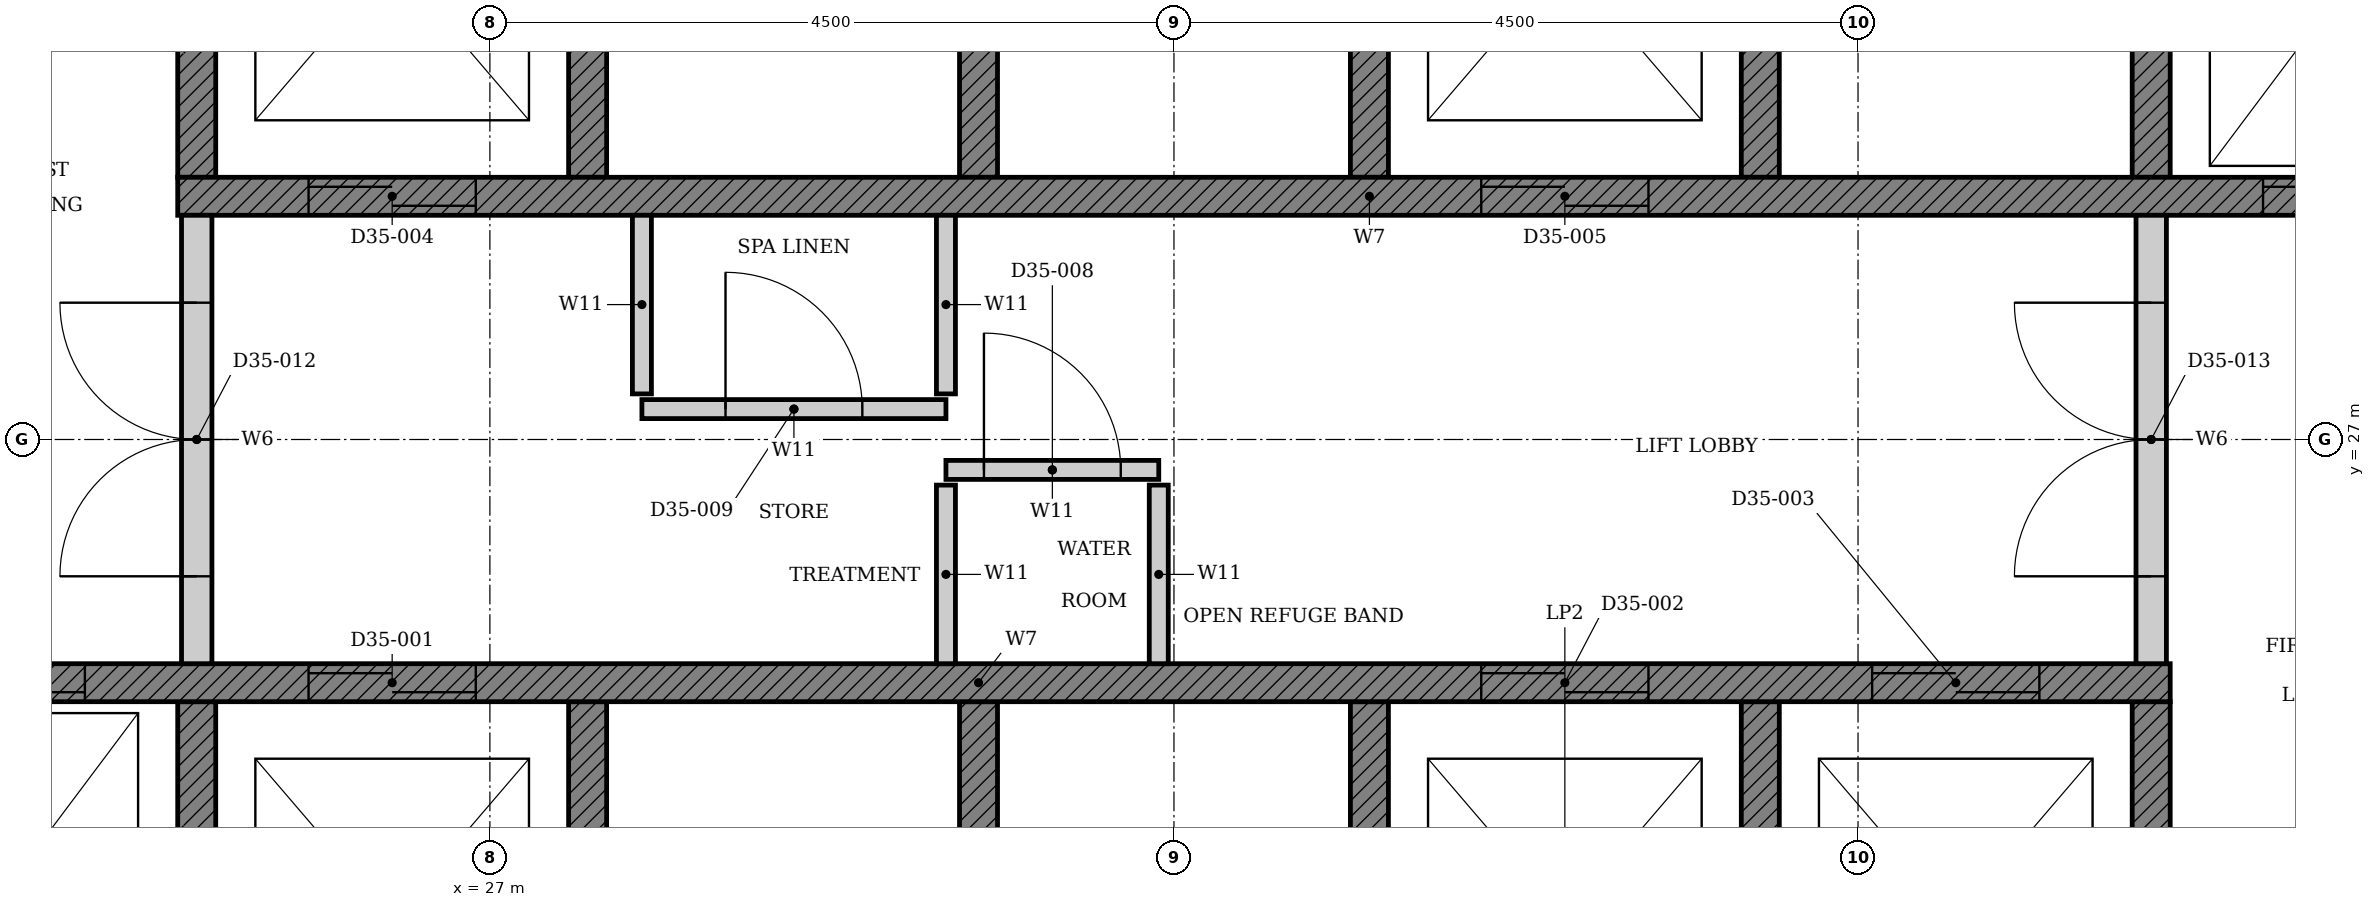
"""IFC4 building model, lengths in metres.
Left out: names, types, materials, properties, quantities, classifications, styles, units other than length and angle.
Written with IfcOpenShell. Run it as: python <this file> out.ifc"""

import sys

from ifc_helpers import new_model, si_unit, direction, frame, frame_2d, origin, place, context, subcontext, project, spatial, polyline, rectangle, outline, extrude, element, fill, save


model = new_model("IFC4")
c1 = context("Model", 3, precision=1e-05, world=origin(), true_north=direction((0.0, 1.0)))
c2 = subcontext(c1, "Body", "Model", "MODEL_VIEW")
j1 = project(units=[si_unit("LENGTHUNIT", "METRE"), si_unit("PLANEANGLEUNIT", "RADIAN")], contexts=[c1])
p1 = place(None, origin())
s1 = spatial("IfcSite", under=j1, at=p1, CompositionType="ELEMENT")
p2 = place(p1, origin())
s2 = spatial("IfcBuilding", under=s1, at=p2, CompositionType="ELEMENT")
p3 = place(p2, frame((0.0, 0.0, 140.4)))
s3 = spatial("IfcBuildingStorey", under=s2, at=p3, CompositionType="ELEMENT", Elevation=140.4)
p4 = place(p3, origin())
e1 = element("IfcWall", 1, at=p4, inside=s3, PredefinedType="SHEAR", context=c2, shape_type="SweptSolid", body=[
    extrude(outline(polyline([(22.375, 22.35), (38.053, 22.35), (38.053, 25.275), (37.803, 25.275), (37.803, 22.65), (35.482, 22.65), (35.482, 25.275), (35.232, 25.275), (35.232, 22.65), (32.911, 22.65), (32.911, 25.275), (32.661, 25.275), (32.661, 22.65), (30.339, 22.65), (30.339, 25.275), (30.089, 25.275), (30.089, 22.65), (27.768, 22.65), (27.768, 25.275), (27.518, 25.275), (27.518, 22.65), (25.197, 22.65), (25.197, 25.275), (24.947, 25.275), (24.947, 22.65), (22.625, 22.65), (22.625, 25.275), (22.375, 25.275), (22.375, 22.35)])), origin(), (0.0, 0.0, 1.0), 4.45),
])
p5 = place(p3, origin())
e2 = element("IfcWall", 2, at=p5, inside=s3, PredefinedType="SHEAR", context=c2, shape_type="SweptSolid", body=[
    extrude(outline(polyline([(24.947, 28.725), (25.197, 28.725), (25.197, 31.35), (27.518, 31.35), (27.518, 28.725), (27.768, 28.725), (27.768, 31.35), (30.089, 31.35), (30.089, 28.725), (30.339, 28.725), (30.339, 31.35), (32.661, 31.35), (32.661, 28.725), (32.911, 28.725), (32.911, 31.35), (35.232, 31.35), (35.232, 28.725), (35.482, 28.725), (35.482, 31.35), (37.803, 31.35), (37.803, 28.725), (38.053, 28.725), (38.053, 31.35), (40.375, 31.35), (40.375, 28.725), (40.625, 28.725), (40.625, 31.65), (24.947, 31.65), (24.947, 28.725)])), origin(), (0.0, 0.0, 1.0), 4.45),
])
p6 = place(p3, frame((22.375, 25.4, 0.0), z_axis=(0.0, 0.0, 1.0), x_axis=(1.0, 0.0, 0.0)))
e3 = element("IfcWall", 3, at=p6, inside=s3, PredefinedType="SHEAR", context=c2, shape_type="SweptSolid", body=[
    extrude(rectangle(XDim=15.678, YDim=0.25, at=frame_2d((7.839, 0.0))), origin(), (0.0, 0.0, 1.0), 4.45),
])
p7 = place(p6, frame((3.432, 0.0, 0.0)))
e4 = element("IfcOpeningElement", 4, at=p7, cuts=e3, PredefinedType="OPENING", context=c2, shape_type="SweptSolid", body=[
    extrude(rectangle(XDim=1.1, YDim=2.1, at=frame_2d((0.55, 1.05))), frame((0.0, 0.135, 0.0), z_axis=(0.0, -1.0, 0.0), x_axis=(1.0, 0.0, 0.0)), (0.0, 0.0, 1.0), 0.27),
])
p8 = place(p6, frame((11.146, 0.0, 0.0)))
e5 = element("IfcOpeningElement", 5, at=p8, cuts=e3, PredefinedType="OPENING", context=c2, shape_type="SweptSolid", body=[
    extrude(rectangle(XDim=1.1, YDim=2.1, at=frame_2d((0.55, 1.05))), frame((0.0, 0.135, 0.0), z_axis=(0.0, -1.0, 0.0), x_axis=(1.0, 0.0, 0.0)), (0.0, 0.0, 1.0), 0.27),
])
p9 = place(p6, frame((13.718, 0.0, 0.0)))
e6 = element("IfcOpeningElement", 6, at=p9, cuts=e3, PredefinedType="OPENING", context=c2, shape_type="SweptSolid", body=[
    extrude(rectangle(XDim=1.1, YDim=2.1, at=frame_2d((0.55, 1.05))), frame((0.0, 0.135, 0.0), z_axis=(0.0, -1.0, 0.0), x_axis=(1.0, 0.0, 0.0)), (0.0, 0.0, 1.0), 0.27),
])
p10 = place(p6, frame((0.861, 0.0, 0.0)))
e7 = element("IfcOpeningElement", 7, at=p10, cuts=e3, PredefinedType="OPENING", context=c2, shape_type="SweptSolid", body=[
    extrude(rectangle(XDim=1.1, YDim=2.1, at=frame_2d((0.55, 1.05))), frame((0.0, 0.135, 0.0), z_axis=(0.0, -1.0, 0.0), x_axis=(1.0, 0.0, 0.0)), (0.0, 0.0, 1.0), 0.27),
])
p11 = place(p3, frame((24.947, 28.6, 0.0), z_axis=(0.0, 0.0, 1.0), x_axis=(1.0, 0.0, 0.0)))
e8 = element("IfcWall", 8, at=p11, inside=s3, PredefinedType="SHEAR", context=c2, shape_type="SweptSolid", body=[
    extrude(rectangle(XDim=15.678, YDim=0.25, at=frame_2d((7.839, 0.0))), origin(), (0.0, 0.0, 1.0), 4.45),
])
p12 = place(p11, frame((0.861, 0.0, 0.0)))
e9 = element("IfcOpeningElement", 9, at=p12, cuts=e8, PredefinedType="OPENING", context=c2, shape_type="SweptSolid", body=[
    extrude(rectangle(XDim=1.1, YDim=2.1, at=frame_2d((0.55, 1.05))), frame((0.0, 0.135, 0.0), z_axis=(0.0, -1.0, 0.0), x_axis=(1.0, 0.0, 0.0)), (0.0, 0.0, 1.0), 0.27),
])
p13 = place(p11, frame((8.575, 0.0, 0.0)))
e10 = element("IfcOpeningElement", 10, at=p13, cuts=e8, PredefinedType="OPENING", context=c2, shape_type="SweptSolid", body=[
    extrude(rectangle(XDim=1.1, YDim=2.1, at=frame_2d((0.55, 1.05))), frame((0.0, 0.135, 0.0), z_axis=(0.0, -1.0, 0.0), x_axis=(1.0, 0.0, 0.0)), (0.0, 0.0, 1.0), 0.27),
])
p14 = place(p11, frame((13.718, 0.0, 0.0)))
e11 = element("IfcOpeningElement", 11, at=p14, cuts=e8, PredefinedType="OPENING", context=c2, shape_type="SweptSolid", body=[
    extrude(rectangle(XDim=1.1, YDim=2.1, at=frame_2d((0.55, 1.05))), frame((0.0, 0.135, 0.0), z_axis=(0.0, -1.0, 0.0), x_axis=(1.0, 0.0, 0.0)), (0.0, 0.0, 1.0), 0.27),
])
p15 = place(p3, frame((30.0, 26.8, 0.0), z_axis=(0.0, 0.0, 1.0), x_axis=(1.0, 0.0, 0.0)))
e12 = element("IfcWall", 12, at=p15, inside=s3, PredefinedType="PARTITIONING", context=c2, shape_type="SweptSolid", body=[
    extrude(rectangle(XDim=1.4, YDim=0.125, at=frame_2d((0.7, 0.0))), origin(), (0.0, 0.0, 1.0), 4.45),
])
p16 = place(p15, frame((0.25, 0.0, 0.0)))
e13 = element("IfcOpeningElement", 13, at=p16, cuts=e12, PredefinedType="OPENING", context=c2, shape_type="SweptSolid", body=[
    extrude(rectangle(XDim=0.9, YDim=2.1, at=frame_2d((0.45, 1.05))), frame((0.0, 0.073, 0.0), z_axis=(0.0, -1.0, 0.0), x_axis=(1.0, 0.0, 0.0)), (0.0, 0.0, 1.0), 0.145),
])
for number, where, z_axis, x_axis in (
    (14, (30.0, 25.525, 0.0), (0.0, 0.0, 1.0), (0.0, 1.0, 0.0)),
    (15, (31.4, 25.525, 0.0), (0.0, 0.0, 1.0), (0.0, 1.0, 0.0)),
):
    element("IfcWall", number, at=place(p3, frame(where, z_axis=z_axis, x_axis=x_axis)), inside=s3, PredefinedType="PARTITIONING", context=c2, shape_type="SweptSolid", body=[
        extrude(rectangle(XDim=1.175, YDim=0.125, at=frame_2d((0.587, 0.0))), origin(), (0.0, 0.0, 1.0), 4.45),
    ])
p17 = place(p3, frame((28.0, 27.2, 0.0), z_axis=(0.0, 0.0, 1.0), x_axis=(1.0, 0.0, 0.0)))
e16 = element("IfcWall", 16, at=p17, inside=s3, PredefinedType="PARTITIONING", context=c2, shape_type="SweptSolid", body=[
    extrude(rectangle(XDim=2.0, YDim=0.125, at=frame_2d((1.0, 0.0))), origin(), (0.0, 0.0, 1.0), 4.45),
])
p18 = place(p17, frame((0.55, 0.0, 0.0)))
e17 = element("IfcOpeningElement", 17, at=p18, cuts=e16, PredefinedType="OPENING", context=c2, shape_type="SweptSolid", body=[
    extrude(rectangle(XDim=0.9, YDim=2.1, at=frame_2d((0.45, 1.05))), frame((0.0, 0.073, 0.0), z_axis=(0.0, -1.0, 0.0), x_axis=(1.0, 0.0, 0.0)), (0.0, 0.0, 1.0), 0.145),
])
for number, where, z_axis, x_axis in (
    (18, (28.0, 28.475, 0.0), (0.0, 0.0, 1.0), (0.0, -1.0, 0.0)),
    (19, (30.0, 28.475, 0.0), (0.0, 0.0, 1.0), (0.0, -1.0, 0.0)),
):
    element("IfcWall", number, at=place(p3, frame(where, z_axis=z_axis, x_axis=x_axis)), inside=s3, PredefinedType="PARTITIONING", context=c2, shape_type="SweptSolid", body=[
        extrude(rectangle(XDim=1.175, YDim=0.125, at=frame_2d((0.587, 0.0))), origin(), (0.0, 0.0, 1.0), 4.45),
    ])
p19 = place(p3, frame((25.072, 25.525, 0.0), z_axis=(0.0, 0.0, 1.0), x_axis=(0.0, 1.0, 0.0)))
e20 = element("IfcWall", 20, at=p19, inside=s3, PredefinedType="PARTITIONING", context=c2, shape_type="SweptSolid", body=[
    extrude(rectangle(XDim=2.95, YDim=0.2, at=frame_2d((1.475, 0.0))), origin(), (0.0, 0.0, 1.0), 4.45),
])
p20 = place(p19, frame((0.575, 0.0, 0.0)))
e21 = element("IfcOpeningElement", 21, at=p20, cuts=e20, PredefinedType="OPENING", context=c2, shape_type="SweptSolid", body=[
    extrude(rectangle(XDim=1.8, YDim=2.1, at=frame_2d((0.9, 1.05))), frame((0.0, 0.11, 0.0), z_axis=(0.0, -1.0, 0.0), x_axis=(1.0, 0.0, 0.0)), (0.0, 0.0, 1.0), 0.22),
])
p21 = place(p3, frame((37.928, 25.525, 0.0), z_axis=(0.0, 0.0, 1.0), x_axis=(0.0, 1.0, 0.0)))
e22 = element("IfcWall", 22, at=p21, inside=s3, PredefinedType="PARTITIONING", context=c2, shape_type="SweptSolid", body=[
    extrude(rectangle(XDim=2.95, YDim=0.2, at=frame_2d((1.475, 0.0))), origin(), (0.0, 0.0, 1.0), 4.45),
])
p22 = place(p21, frame((0.575, 0.0, 0.0)))
e23 = element("IfcOpeningElement", 23, at=p22, cuts=e22, PredefinedType="OPENING", context=c2, shape_type="SweptSolid", body=[
    extrude(rectangle(XDim=1.8, YDim=2.1, at=frame_2d((0.9, 1.05))), frame((0.0, 0.11, 0.0), z_axis=(0.0, -1.0, 0.0), x_axis=(1.0, 0.0, 0.0)), (0.0, 0.0, 1.0), 0.22),
])
p23 = place(p7, origin())
e24 = element("IfcDoor", 24, at=p23, inside=s3, OperationType="DOUBLE_DOOR_SLIDING", PredefinedType="DOOR", context=c2, shape_type="SweptSolid", body=[
    extrude(rectangle(XDim=1.1, YDim=2.1, at=frame_2d((0.55, 1.05))), frame((0.0, 0.025, 0.0), z_axis=(0.0, -1.0, 0.0), x_axis=(1.0, 0.0, 0.0)), (0.0, 0.0, 1.0), 0.05),
])
fill(e4, e24)
p24 = place(p8, origin())
e25 = element("IfcDoor", 25, at=p24, inside=s3, OperationType="DOUBLE_DOOR_SLIDING", PredefinedType="DOOR", context=c2, shape_type="SweptSolid", body=[
    extrude(rectangle(XDim=1.1, YDim=2.1, at=frame_2d((0.55, 1.05))), frame((0.0, 0.025, 0.0), z_axis=(0.0, -1.0, 0.0), x_axis=(1.0, 0.0, 0.0)), (0.0, 0.0, 1.0), 0.05),
])
fill(e5, e25)
p25 = place(p9, origin())
e26 = element("IfcDoor", 26, at=p25, inside=s3, OperationType="DOUBLE_DOOR_SLIDING", PredefinedType="DOOR", context=c2, shape_type="SweptSolid", body=[
    extrude(rectangle(XDim=1.1, YDim=2.1, at=frame_2d((0.55, 1.05))), frame((0.0, 0.025, 0.0), z_axis=(0.0, -1.0, 0.0), x_axis=(1.0, 0.0, 0.0)), (0.0, 0.0, 1.0), 0.05),
])
fill(e6, e26)
p26 = place(p12, origin())
e27 = element("IfcDoor", 27, at=p26, inside=s3, OperationType="DOUBLE_DOOR_SLIDING", PredefinedType="DOOR", context=c2, shape_type="SweptSolid", body=[
    extrude(rectangle(XDim=1.1, YDim=2.1, at=frame_2d((0.55, 1.05))), frame((0.0, 0.025, 0.0), z_axis=(0.0, -1.0, 0.0), x_axis=(1.0, 0.0, 0.0)), (0.0, 0.0, 1.0), 0.05),
])
fill(e9, e27)
p27 = place(p13, origin())
e28 = element("IfcDoor", 28, at=p27, inside=s3, OperationType="DOUBLE_DOOR_SLIDING", PredefinedType="DOOR", context=c2, shape_type="SweptSolid", body=[
    extrude(rectangle(XDim=1.1, YDim=2.1, at=frame_2d((0.55, 1.05))), frame((0.0, 0.025, 0.0), z_axis=(0.0, -1.0, 0.0), x_axis=(1.0, 0.0, 0.0)), (0.0, 0.0, 1.0), 0.05),
])
fill(e10, e28)
p28 = place(p10, origin())
e29 = element("IfcDoor", 29, at=p28, inside=s3, OperationType="DOUBLE_DOOR_SLIDING", PredefinedType="DOOR", context=c2, shape_type="SweptSolid", body=[
    extrude(rectangle(XDim=1.1, YDim=2.1, at=frame_2d((0.55, 1.05))), frame((0.0, 0.025, 0.0), z_axis=(0.0, -1.0, 0.0), x_axis=(1.0, 0.0, 0.0)), (0.0, 0.0, 1.0), 0.05),
])
fill(e7, e29)
p29 = place(p14, origin())
e30 = element("IfcDoor", 30, at=p29, inside=s3, OperationType="DOUBLE_DOOR_SLIDING", PredefinedType="DOOR", context=c2, shape_type="SweptSolid", body=[
    extrude(rectangle(XDim=1.1, YDim=2.1, at=frame_2d((0.55, 1.05))), frame((0.0, 0.025, 0.0), z_axis=(0.0, -1.0, 0.0), x_axis=(1.0, 0.0, 0.0)), (0.0, 0.0, 1.0), 0.05),
])
fill(e11, e30)
p30 = place(p16, origin())
e31 = element("IfcDoor", 31, at=p30, inside=s3, OperationType="SINGLE_SWING_LEFT", PredefinedType="DOOR", context=c2, shape_type="SweptSolid", body=[
    extrude(rectangle(XDim=0.9, YDim=2.1, at=frame_2d((0.45, 1.05))), frame((0.0, 0.025, 0.0), z_axis=(0.0, -1.0, 0.0), x_axis=(1.0, 0.0, 0.0)), (0.0, 0.0, 1.0), 0.05),
])
fill(e13, e31)
p31 = place(p18, origin())
e32 = element("IfcDoor", 32, at=p31, inside=s3, OperationType="SINGLE_SWING_LEFT", PredefinedType="DOOR", context=c2, shape_type="SweptSolid", body=[
    extrude(rectangle(XDim=0.9, YDim=2.1, at=frame_2d((0.45, 1.05))), frame((0.0, 0.025, 0.0), z_axis=(0.0, -1.0, 0.0), x_axis=(1.0, 0.0, 0.0)), (0.0, 0.0, 1.0), 0.05),
])
fill(e17, e32)
p32 = place(p20, origin())
e33 = element("IfcDoor", 33, at=p32, inside=s3, OperationType="DOUBLE_DOOR_SINGLE_SWING", PredefinedType="DOOR", context=c2, shape_type="SweptSolid", body=[
    extrude(rectangle(XDim=1.8, YDim=2.1, at=frame_2d((0.9, 1.05))), frame((0.0, 0.025, 0.0), z_axis=(0.0, -1.0, 0.0), x_axis=(1.0, 0.0, 0.0)), (0.0, 0.0, 1.0), 0.05),
])
fill(e21, e33)
p33 = place(p22, origin())
e34 = element("IfcDoor", 34, at=p33, inside=s3, OperationType="DOUBLE_DOOR_SINGLE_SWING", PredefinedType="DOOR", context=c2, shape_type="SweptSolid", body=[
    extrude(rectangle(XDim=1.8, YDim=2.1, at=frame_2d((0.9, 1.05))), frame((0.0, 0.025, 0.0), z_axis=(0.0, -1.0, 0.0), x_axis=(1.0, 0.0, 0.0)), (0.0, 0.0, 1.0), 0.05),
])
fill(e23, e34)
save(model, sys.argv[1])
